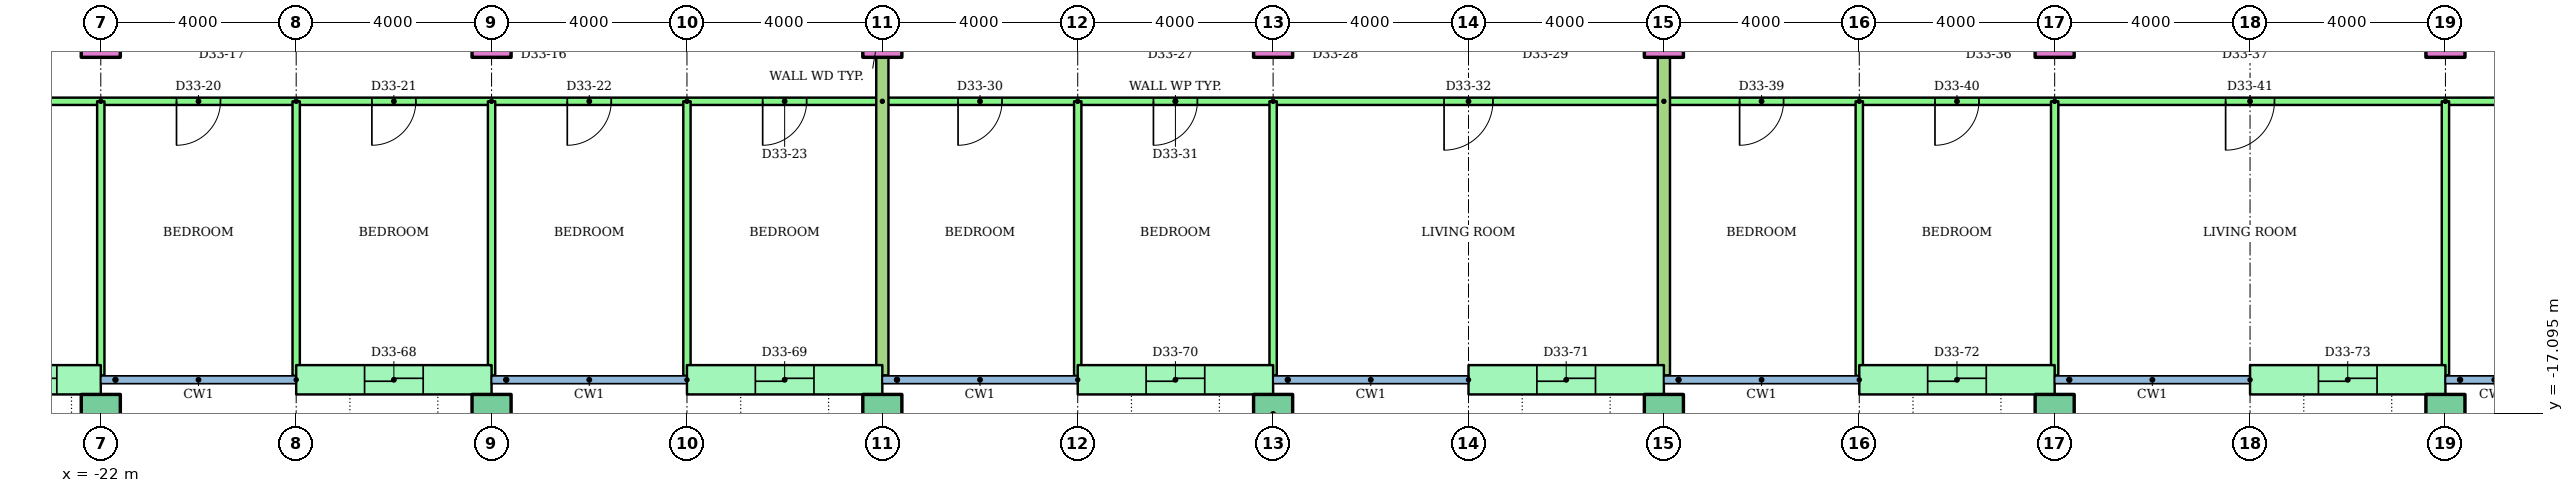
"""IFC4 building model, lengths in metres.
Left out: names, types, materials, properties, quantities, classifications, styles, units other than length and angle.
Written with IfcOpenShell. Run it as: python <this file> out.ifc"""

import sys

from ifc_helpers import new_model, si_unit, direction, frame, frame_2d, origin, origin_2d, place, context, subcontext, project, spatial, rectangle, hollow_rectangle, extrude, element, fill, save


model = new_model("IFC4")
c1 = context("Model", 3, precision=1e-05, world=origin(), true_north=direction((0.0, 1.0)))
c2 = subcontext(c1, "Body", "Model", "MODEL_VIEW")
j1 = project(units=[si_unit("LENGTHUNIT", "METRE"), si_unit("PLANEANGLEUNIT", "RADIAN")], contexts=[c1])
p1 = place(None, origin())
s1 = spatial("IfcSite", under=j1, at=p1, CompositionType="ELEMENT")
p2 = place(p1, origin())
s2 = spatial("IfcBuilding", under=s1, at=p2, CompositionType="ELEMENT")
p3 = place(p2, frame((0.0, 0.0, 129.4)))
s3 = spatial("IfcBuildingStorey", under=s2, at=p3, CompositionType="ELEMENT", Elevation=129.4)
for number, where in (
    (1, (-22.0, -17.1, 0.0)),
    (2, (-14.0, -17.1, 0.0)),
    (3, (-6.0, -17.1, 0.0)),
    (4, (2.0, -17.1, 0.0)),
    (5, (10.0, -17.1, 0.0)),
    (6, (18.0, -17.1, 0.0)),
    (7, (26.0, -17.1, 0.0)),
):
    element("IfcColumn", number, at=place(p3, frame(where)), inside=s3, PredefinedType="COLUMN", context=c2, shape_type="SweptSolid", body=[
        extrude(hollow_rectangle(XDim=0.8, YDim=0.8, WallThickness=0.04, at=origin_2d()), origin(), (0.0, 0.0, 1.0), 3.2),
    ])
for number, where in (
    (8, (-22.0, -9.4, 0.0)),
    (9, (-14.0, -9.4, 0.0)),
    (10, (-6.0, -9.4, 0.0)),
    (11, (2.0, -9.4, 0.0)),
    (12, (10.0, -9.4, 0.0)),
    (13, (18.0, -9.4, 0.0)),
    (14, (26.0, -9.4, 0.0)),
):
    element("IfcColumn", number, at=place(p3, frame(where)), inside=s3, PredefinedType="COLUMN", context=c2, shape_type="SweptSolid", body=[
        extrude(rectangle(XDim=0.8, YDim=0.8, at=origin_2d()), origin(), (0.0, 0.0, 1.0), 3.2),
    ])
p4 = place(p3, frame((-25.0, -16.4, 0.0)))
e15 = element("IfcWall", 15, at=p4, inside=s3, PredefinedType="STANDARD", context=c2, shape_type="SweptSolid", body=[
    extrude(rectangle(XDim=3.0, YDim=0.6, at=frame_2d((1.5, 0.0))), origin(), (0.0, 0.0, 1.0), 2.92),
])
p5 = place(p4, frame((0.9, 0.0, 0.0)))
e16 = element("IfcOpeningElement", 16, at=p5, cuts=e15, PredefinedType="OPENING", context=c2, shape_type="SweptSolid", body=[
    extrude(rectangle(XDim=1.2, YDim=2.1, at=frame_2d((0.6, 1.05))), frame((0.0, 0.31, 0.0), z_axis=(0.0, -1.0, 0.0), x_axis=(1.0, 0.0, 0.0)), (0.0, 0.0, 1.0), 0.62),
])
p6 = place(p3, frame((-18.0, -16.4, 0.0)))
e17 = element("IfcWall", 17, at=p6, inside=s3, PredefinedType="STANDARD", context=c2, shape_type="SweptSolid", body=[
    extrude(rectangle(XDim=4.0, YDim=0.6, at=frame_2d((2.0, 0.0))), origin(), (0.0, 0.0, 1.0), 2.92),
])
p7 = place(p6, frame((1.4, 0.0, 0.0)))
e18 = element("IfcOpeningElement", 18, at=p7, cuts=e17, PredefinedType="OPENING", context=c2, shape_type="SweptSolid", body=[
    extrude(rectangle(XDim=1.2, YDim=2.1, at=frame_2d((0.6, 1.05))), frame((0.0, 0.31, 0.0), z_axis=(0.0, -1.0, 0.0), x_axis=(1.0, 0.0, 0.0)), (0.0, 0.0, 1.0), 0.62),
])
p8 = place(p3, frame((-10.0, -16.4, 0.0)))
e19 = element("IfcWall", 19, at=p8, inside=s3, PredefinedType="STANDARD", context=c2, shape_type="SweptSolid", body=[
    extrude(rectangle(XDim=4.0, YDim=0.6, at=frame_2d((2.0, 0.0))), origin(), (0.0, 0.0, 1.0), 2.92),
])
p9 = place(p8, frame((1.4, 0.0, 0.0)))
e20 = element("IfcOpeningElement", 20, at=p9, cuts=e19, PredefinedType="OPENING", context=c2, shape_type="SweptSolid", body=[
    extrude(rectangle(XDim=1.2, YDim=2.1, at=frame_2d((0.6, 1.05))), frame((0.0, 0.31, 0.0), z_axis=(0.0, -1.0, 0.0), x_axis=(1.0, 0.0, 0.0)), (0.0, 0.0, 1.0), 0.62),
])
p10 = place(p3, frame((-2.0, -16.4, 0.0)))
e21 = element("IfcWall", 21, at=p10, inside=s3, PredefinedType="STANDARD", context=c2, shape_type="SweptSolid", body=[
    extrude(rectangle(XDim=4.0, YDim=0.6, at=frame_2d((2.0, 0.0))), origin(), (0.0, 0.0, 1.0), 2.92),
])
p11 = place(p10, frame((1.4, 0.0, 0.0)))
e22 = element("IfcOpeningElement", 22, at=p11, cuts=e21, PredefinedType="OPENING", context=c2, shape_type="SweptSolid", body=[
    extrude(rectangle(XDim=1.2, YDim=2.1, at=frame_2d((0.6, 1.05))), frame((0.0, 0.31, 0.0), z_axis=(0.0, -1.0, 0.0), x_axis=(1.0, 0.0, 0.0)), (0.0, 0.0, 1.0), 0.62),
])
p12 = place(p3, frame((6.0, -16.4, 0.0)))
e23 = element("IfcWall", 23, at=p12, inside=s3, PredefinedType="STANDARD", context=c2, shape_type="SweptSolid", body=[
    extrude(rectangle(XDim=4.0, YDim=0.6, at=frame_2d((2.0, 0.0))), origin(), (0.0, 0.0, 1.0), 2.92),
])
p13 = place(p12, frame((1.4, 0.0, 0.0)))
e24 = element("IfcOpeningElement", 24, at=p13, cuts=e23, PredefinedType="OPENING", context=c2, shape_type="SweptSolid", body=[
    extrude(rectangle(XDim=1.2, YDim=2.1, at=frame_2d((0.6, 1.05))), frame((0.0, 0.31, 0.0), z_axis=(0.0, -1.0, 0.0), x_axis=(1.0, 0.0, 0.0)), (0.0, 0.0, 1.0), 0.62),
])
p14 = place(p3, frame((14.0, -16.4, 0.0)))
e25 = element("IfcWall", 25, at=p14, inside=s3, PredefinedType="STANDARD", context=c2, shape_type="SweptSolid", body=[
    extrude(rectangle(XDim=4.0, YDim=0.6, at=frame_2d((2.0, 0.0))), origin(), (0.0, 0.0, 1.0), 2.92),
])
p15 = place(p14, frame((1.4, 0.0, 0.0)))
e26 = element("IfcOpeningElement", 26, at=p15, cuts=e25, PredefinedType="OPENING", context=c2, shape_type="SweptSolid", body=[
    extrude(rectangle(XDim=1.2, YDim=2.1, at=frame_2d((0.6, 1.05))), frame((0.0, 0.31, 0.0), z_axis=(0.0, -1.0, 0.0), x_axis=(1.0, 0.0, 0.0)), (0.0, 0.0, 1.0), 0.62),
])
p16 = place(p3, frame((22.0, -16.4, 0.0)))
e27 = element("IfcWall", 27, at=p16, inside=s3, PredefinedType="STANDARD", context=c2, shape_type="SweptSolid", body=[
    extrude(rectangle(XDim=4.0, YDim=0.6, at=frame_2d((2.0, 0.0))), origin(), (0.0, 0.0, 1.0), 2.92),
])
p17 = place(p16, frame((1.4, 0.0, 0.0)))
e28 = element("IfcOpeningElement", 28, at=p17, cuts=e27, PredefinedType="OPENING", context=c2, shape_type="SweptSolid", body=[
    extrude(rectangle(XDim=1.2, YDim=2.1, at=frame_2d((0.6, 1.05))), frame((0.0, 0.31, 0.0), z_axis=(0.0, -1.0, 0.0), x_axis=(1.0, 0.0, 0.0)), (0.0, 0.0, 1.0), 0.62),
])
p18 = place(p3, frame((-6.0, -10.7, 0.0), z_axis=(0.0, 0.0, 1.0), x_axis=(-1.0, 0.0, 0.0)))
e29 = element("IfcWall", 29, at=p18, inside=s3, PredefinedType="PARTITIONING", context=c2, shape_type="SweptSolid", body=[
    extrude(rectangle(XDim=26.72, YDim=0.15, at=frame_2d((13.36, 0.0))), origin(), (0.0, 0.0, 1.0), 2.4),
])
p19 = place(p18, frame((20.75, 0.0, 0.0)))
e30 = element("IfcOpeningElement", 30, at=p19, cuts=e29, PredefinedType="OPENING", context=c2, shape_type="SweptSolid", body=[
    extrude(rectangle(XDim=1.0, YDim=2.1, at=frame_2d((0.5, 1.05))), frame((0.0, 0.085, 0.0), z_axis=(0.0, -1.0, 0.0), x_axis=(1.0, 0.0, 0.0)), (0.0, 0.0, 1.0), 0.17),
])
p20 = place(p18, frame((13.55, 0.0, 0.0)))
e31 = element("IfcOpeningElement", 31, at=p20, cuts=e29, PredefinedType="OPENING", context=c2, shape_type="SweptSolid", body=[
    extrude(rectangle(XDim=0.9, YDim=2.1, at=frame_2d((0.45, 1.05))), frame((0.0, 0.085, 0.0), z_axis=(0.0, -1.0, 0.0), x_axis=(1.0, 0.0, 0.0)), (0.0, 0.0, 1.0), 0.17),
])
p21 = place(p18, frame((9.55, 0.0, 0.0)))
e32 = element("IfcOpeningElement", 32, at=p21, cuts=e29, PredefinedType="OPENING", context=c2, shape_type="SweptSolid", body=[
    extrude(rectangle(XDim=0.9, YDim=2.1, at=frame_2d((0.45, 1.05))), frame((0.0, 0.085, 0.0), z_axis=(0.0, -1.0, 0.0), x_axis=(1.0, 0.0, 0.0)), (0.0, 0.0, 1.0), 0.17),
])
p22 = place(p18, frame((5.55, 0.0, 0.0)))
e33 = element("IfcOpeningElement", 33, at=p22, cuts=e29, PredefinedType="OPENING", context=c2, shape_type="SweptSolid", body=[
    extrude(rectangle(XDim=0.9, YDim=2.1, at=frame_2d((0.45, 1.05))), frame((0.0, 0.085, 0.0), z_axis=(0.0, -1.0, 0.0), x_axis=(1.0, 0.0, 0.0)), (0.0, 0.0, 1.0), 0.17),
])
p23 = place(p18, frame((1.55, 0.0, 0.0)))
e34 = element("IfcOpeningElement", 34, at=p23, cuts=e29, PredefinedType="OPENING", context=c2, shape_type="SweptSolid", body=[
    extrude(rectangle(XDim=0.9, YDim=2.1, at=frame_2d((0.45, 1.05))), frame((0.0, 0.085, 0.0), z_axis=(0.0, -1.0, 0.0), x_axis=(1.0, 0.0, 0.0)), (0.0, 0.0, 1.0), 0.17),
])
p24 = place(p3, frame((-22.0, -10.7, 0.0), z_axis=(0.0, 0.0, 1.0), x_axis=(0.0, -1.0, 0.0)))
e35 = element("IfcWall", 35, at=p24, inside=s3, PredefinedType="PARTITIONING", context=c2, shape_type="SweptSolid", body=[
    extrude(rectangle(XDim=5.61, YDim=0.15, at=frame_2d((2.805, 0.0))), origin(), (0.0, 0.0, 1.0), 2.4),
])
p25 = place(p3, frame((-18.0, -10.7, 0.0), z_axis=(0.0, 0.0, 1.0), x_axis=(0.0, -1.0, 0.0)))
e36 = element("IfcWall", 36, at=p25, inside=s3, PredefinedType="PARTITIONING", context=c2, shape_type="SweptSolid", body=[
    extrude(rectangle(XDim=5.621, YDim=0.15, at=frame_2d((2.811, 0.0))), origin(), (0.0, 0.0, 1.0), 2.4),
])
p26 = place(p3, frame((-14.0, -10.7, 0.0), z_axis=(0.0, 0.0, 1.0), x_axis=(0.0, -1.0, 0.0)))
e37 = element("IfcWall", 37, at=p26, inside=s3, PredefinedType="PARTITIONING", context=c2, shape_type="SweptSolid", body=[
    extrude(rectangle(XDim=5.61, YDim=0.15, at=frame_2d((2.805, 0.0))), origin(), (0.0, 0.0, 1.0), 2.4),
])
p27 = place(p3, frame((-10.0, -10.7, 0.0), z_axis=(0.0, 0.0, 1.0), x_axis=(0.0, -1.0, 0.0)))
e38 = element("IfcWall", 38, at=p27, inside=s3, PredefinedType="PARTITIONING", context=c2, shape_type="SweptSolid", body=[
    extrude(rectangle(XDim=5.621, YDim=0.15, at=frame_2d((2.811, 0.0))), origin(), (0.0, 0.0, 1.0), 2.4),
])
p28 = place(p3, frame((10.0, -10.7, 0.0), z_axis=(0.0, 0.0, 1.0), x_axis=(-1.0, 0.0, 0.0)))
e39 = element("IfcWall", 39, at=p28, inside=s3, PredefinedType="PARTITIONING", context=c2, shape_type="SweptSolid", body=[
    extrude(rectangle(XDim=16.0, YDim=0.15, at=frame_2d((8.0, 0.0))), origin(), (0.0, 0.0, 1.0), 2.4),
])
p29 = place(p28, frame((13.55, 0.0, 0.0)))
e40 = element("IfcOpeningElement", 40, at=p29, cuts=e39, PredefinedType="OPENING", context=c2, shape_type="SweptSolid", body=[
    extrude(rectangle(XDim=0.9, YDim=2.1, at=frame_2d((0.45, 1.05))), frame((0.0, 0.085, 0.0), z_axis=(0.0, -1.0, 0.0), x_axis=(1.0, 0.0, 0.0)), (0.0, 0.0, 1.0), 0.17),
])
p30 = place(p28, frame((9.55, 0.0, 0.0)))
e41 = element("IfcOpeningElement", 41, at=p30, cuts=e39, PredefinedType="OPENING", context=c2, shape_type="SweptSolid", body=[
    extrude(rectangle(XDim=0.9, YDim=2.1, at=frame_2d((0.45, 1.05))), frame((0.0, 0.085, 0.0), z_axis=(0.0, -1.0, 0.0), x_axis=(1.0, 0.0, 0.0)), (0.0, 0.0, 1.0), 0.17),
])
p31 = place(p28, frame((3.5, 0.0, 0.0)))
e42 = element("IfcOpeningElement", 42, at=p31, cuts=e39, PredefinedType="OPENING", context=c2, shape_type="SweptSolid", body=[
    extrude(rectangle(XDim=1.0, YDim=2.1, at=frame_2d((0.5, 1.05))), frame((0.0, 0.085, 0.0), z_axis=(0.0, -1.0, 0.0), x_axis=(1.0, 0.0, 0.0)), (0.0, 0.0, 1.0), 0.17),
])
p32 = place(p3, frame((-2.0, -10.7, 0.0), z_axis=(0.0, 0.0, 1.0), x_axis=(0.0, -1.0, 0.0)))
e43 = element("IfcWall", 43, at=p32, inside=s3, PredefinedType="PARTITIONING", context=c2, shape_type="SweptSolid", body=[
    extrude(rectangle(XDim=5.621, YDim=0.15, at=frame_2d((2.811, 0.0))), origin(), (0.0, 0.0, 1.0), 2.4),
])
p33 = place(p3, frame((2.0, -10.7, 0.0), z_axis=(0.0, 0.0, 1.0), x_axis=(0.0, -1.0, 0.0)))
e44 = element("IfcWall", 44, at=p33, inside=s3, PredefinedType="PARTITIONING", context=c2, shape_type="SweptSolid", body=[
    extrude(rectangle(XDim=5.61, YDim=0.15, at=frame_2d((2.805, 0.0))), origin(), (0.0, 0.0, 1.0), 2.4),
])
p34 = place(p3, frame((-6.0, -1.4, 0.0), z_axis=(0.0, 0.0, 1.0), x_axis=(0.0, -1.0, 0.0)))
e45 = element("IfcWall", 45, at=p34, inside=s3, PredefinedType="PARTITIONING", context=c2, shape_type="SweptSolid", body=[
    extrude(rectangle(XDim=14.91, YDim=0.25, at=frame_2d((7.455, 0.0))), origin(), (0.0, 0.0, 1.0), 2.4),
])
p35 = place(p3, frame((32.72, -10.7, 0.0), z_axis=(0.0, 0.0, 1.0), x_axis=(-1.0, 0.0, 0.0)))
e46 = element("IfcWall", 46, at=p35, inside=s3, PredefinedType="PARTITIONING", context=c2, shape_type="SweptSolid", body=[
    extrude(rectangle(XDim=22.72, YDim=0.15, at=frame_2d((11.36, 0.0))), origin(), (0.0, 0.0, 1.0), 2.4),
])
p36 = place(p35, frame((20.27, 0.0, 0.0)))
e47 = element("IfcOpeningElement", 47, at=p36, cuts=e46, PredefinedType="OPENING", context=c2, shape_type="SweptSolid", body=[
    extrude(rectangle(XDim=0.9, YDim=2.1, at=frame_2d((0.45, 1.05))), frame((0.0, 0.085, 0.0), z_axis=(0.0, -1.0, 0.0), x_axis=(1.0, 0.0, 0.0)), (0.0, 0.0, 1.0), 0.17),
])
p37 = place(p35, frame((16.27, 0.0, 0.0)))
e48 = element("IfcOpeningElement", 48, at=p37, cuts=e46, PredefinedType="OPENING", context=c2, shape_type="SweptSolid", body=[
    extrude(rectangle(XDim=0.9, YDim=2.1, at=frame_2d((0.45, 1.05))), frame((0.0, 0.085, 0.0), z_axis=(0.0, -1.0, 0.0), x_axis=(1.0, 0.0, 0.0)), (0.0, 0.0, 1.0), 0.17),
])
p38 = place(p35, frame((10.22, 0.0, 0.0)))
e49 = element("IfcOpeningElement", 49, at=p38, cuts=e46, PredefinedType="OPENING", context=c2, shape_type="SweptSolid", body=[
    extrude(rectangle(XDim=1.0, YDim=2.1, at=frame_2d((0.5, 1.05))), frame((0.0, 0.085, 0.0), z_axis=(0.0, -1.0, 0.0), x_axis=(1.0, 0.0, 0.0)), (0.0, 0.0, 1.0), 0.17),
])
p39 = place(p35, frame((3.02, 0.0, 0.0)))
e50 = element("IfcOpeningElement", 50, at=p39, cuts=e46, PredefinedType="OPENING", context=c2, shape_type="SweptSolid", body=[
    extrude(rectangle(XDim=0.9, YDim=2.1, at=frame_2d((0.45, 1.05))), frame((0.0, 0.085, 0.0), z_axis=(0.0, -1.0, 0.0), x_axis=(1.0, 0.0, 0.0)), (0.0, 0.0, 1.0), 0.17),
])
p40 = place(p3, frame((14.0, -10.7, 0.0), z_axis=(0.0, 0.0, 1.0), x_axis=(0.0, -1.0, 0.0)))
e51 = element("IfcWall", 51, at=p40, inside=s3, PredefinedType="PARTITIONING", context=c2, shape_type="SweptSolid", body=[
    extrude(rectangle(XDim=5.621, YDim=0.15, at=frame_2d((2.811, 0.0))), origin(), (0.0, 0.0, 1.0), 2.4),
])
for number, where, z_axis, x_axis in (
    (52, (18.0, -10.7, 0.0), (0.0, 0.0, 1.0), (0.0, -1.0, 0.0)),
    (53, (26.0, -10.7, 0.0), (0.0, 0.0, 1.0), (0.0, -1.0, 0.0)),
):
    element("IfcWall", number, at=place(p3, frame(where, z_axis=z_axis, x_axis=x_axis)), inside=s3, PredefinedType="PARTITIONING", context=c2, shape_type="SweptSolid", body=[
        extrude(rectangle(XDim=5.61, YDim=0.15, at=frame_2d((2.805, 0.0))), origin(), (0.0, 0.0, 1.0), 2.4),
    ])
p41 = place(p3, frame((10.0, -1.4, 0.0), z_axis=(0.0, 0.0, 1.0), x_axis=(0.0, -1.0, 0.0)))
e54 = element("IfcWall", 54, at=p41, inside=s3, PredefinedType="PARTITIONING", context=c2, shape_type="SweptSolid", body=[
    extrude(rectangle(XDim=14.91, YDim=0.25, at=frame_2d((7.455, 0.0))), origin(), (0.0, 0.0, 1.0), 2.4),
])
p42 = place(p20, origin())
e55 = element("IfcDoor", 55, at=p42, inside=s3, OperationType="SINGLE_SWING_RIGHT", PredefinedType="DOOR", context=c2, shape_type="SweptSolid", body=[
    extrude(rectangle(XDim=0.9, YDim=2.1, at=frame_2d((0.45, 1.05))), frame((0.0, 0.025, 0.0), z_axis=(0.0, -1.0, 0.0), x_axis=(1.0, 0.0, 0.0)), (0.0, 0.0, 1.0), 0.05),
])
fill(e31, e55)
p43 = place(p21, origin())
e56 = element("IfcDoor", 56, at=p43, inside=s3, OperationType="SINGLE_SWING_RIGHT", PredefinedType="DOOR", context=c2, shape_type="SweptSolid", body=[
    extrude(rectangle(XDim=0.9, YDim=2.1, at=frame_2d((0.45, 1.05))), frame((0.0, 0.025, 0.0), z_axis=(0.0, -1.0, 0.0), x_axis=(1.0, 0.0, 0.0)), (0.0, 0.0, 1.0), 0.05),
])
fill(e32, e56)
p44 = place(p22, origin())
e57 = element("IfcDoor", 57, at=p44, inside=s3, OperationType="SINGLE_SWING_RIGHT", PredefinedType="DOOR", context=c2, shape_type="SweptSolid", body=[
    extrude(rectangle(XDim=0.9, YDim=2.1, at=frame_2d((0.45, 1.05))), frame((0.0, 0.025, 0.0), z_axis=(0.0, -1.0, 0.0), x_axis=(1.0, 0.0, 0.0)), (0.0, 0.0, 1.0), 0.05),
])
fill(e33, e57)
p45 = place(p23, origin())
e58 = element("IfcDoor", 58, at=p45, inside=s3, OperationType="SINGLE_SWING_RIGHT", PredefinedType="DOOR", context=c2, shape_type="SweptSolid", body=[
    extrude(rectangle(XDim=0.9, YDim=2.1, at=frame_2d((0.45, 1.05))), frame((0.0, 0.025, 0.0), z_axis=(0.0, -1.0, 0.0), x_axis=(1.0, 0.0, 0.0)), (0.0, 0.0, 1.0), 0.05),
])
fill(e34, e58)
p46 = place(p29, origin())
e59 = element("IfcDoor", 59, at=p46, inside=s3, OperationType="SINGLE_SWING_RIGHT", PredefinedType="DOOR", context=c2, shape_type="SweptSolid", body=[
    extrude(rectangle(XDim=0.9, YDim=2.1, at=frame_2d((0.45, 1.05))), frame((0.0, 0.025, 0.0), z_axis=(0.0, -1.0, 0.0), x_axis=(1.0, 0.0, 0.0)), (0.0, 0.0, 1.0), 0.05),
])
fill(e40, e59)
p47 = place(p30, origin())
e60 = element("IfcDoor", 60, at=p47, inside=s3, OperationType="SINGLE_SWING_RIGHT", PredefinedType="DOOR", context=c2, shape_type="SweptSolid", body=[
    extrude(rectangle(XDim=0.9, YDim=2.1, at=frame_2d((0.45, 1.05))), frame((0.0, 0.025, 0.0), z_axis=(0.0, -1.0, 0.0), x_axis=(1.0, 0.0, 0.0)), (0.0, 0.0, 1.0), 0.05),
])
fill(e41, e60)
p48 = place(p31, origin())
e61 = element("IfcDoor", 61, at=p48, inside=s3, OperationType="SINGLE_SWING_RIGHT", PredefinedType="DOOR", context=c2, shape_type="SweptSolid", body=[
    extrude(rectangle(XDim=1.0, YDim=2.1, at=frame_2d((0.5, 1.05))), frame((0.0, 0.025, 0.0), z_axis=(0.0, -1.0, 0.0), x_axis=(1.0, 0.0, 0.0)), (0.0, 0.0, 1.0), 0.05),
])
fill(e42, e61)
p49 = place(p36, origin())
e62 = element("IfcDoor", 62, at=p49, inside=s3, OperationType="SINGLE_SWING_RIGHT", PredefinedType="DOOR", context=c2, shape_type="SweptSolid", body=[
    extrude(rectangle(XDim=0.9, YDim=2.1, at=frame_2d((0.45, 1.05))), frame((0.0, 0.025, 0.0), z_axis=(0.0, -1.0, 0.0), x_axis=(1.0, 0.0, 0.0)), (0.0, 0.0, 1.0), 0.05),
])
fill(e47, e62)
p50 = place(p37, origin())
e63 = element("IfcDoor", 63, at=p50, inside=s3, OperationType="SINGLE_SWING_RIGHT", PredefinedType="DOOR", context=c2, shape_type="SweptSolid", body=[
    extrude(rectangle(XDim=0.9, YDim=2.1, at=frame_2d((0.45, 1.05))), frame((0.0, 0.025, 0.0), z_axis=(0.0, -1.0, 0.0), x_axis=(1.0, 0.0, 0.0)), (0.0, 0.0, 1.0), 0.05),
])
fill(e48, e63)
p51 = place(p38, origin())
e64 = element("IfcDoor", 64, at=p51, inside=s3, OperationType="SINGLE_SWING_RIGHT", PredefinedType="DOOR", context=c2, shape_type="SweptSolid", body=[
    extrude(rectangle(XDim=1.0, YDim=2.1, at=frame_2d((0.5, 1.05))), frame((0.0, 0.025, 0.0), z_axis=(0.0, -1.0, 0.0), x_axis=(1.0, 0.0, 0.0)), (0.0, 0.0, 1.0), 0.05),
])
fill(e49, e64)
p52 = place(p5, origin())
e65 = element("IfcDoor", 65, at=p52, inside=s3, OperationType="SLIDING_TO_LEFT", PredefinedType="DOOR", context=c2, shape_type="SweptSolid", body=[
    extrude(rectangle(XDim=1.2, YDim=2.1, at=frame_2d((0.6, 1.05))), frame((0.0, 0.025, 0.0), z_axis=(0.0, -1.0, 0.0), x_axis=(1.0, 0.0, 0.0)), (0.0, 0.0, 1.0), 0.05),
])
fill(e16, e65)
p53 = place(p7, origin())
e66 = element("IfcDoor", 66, at=p53, inside=s3, OperationType="SLIDING_TO_LEFT", PredefinedType="DOOR", context=c2, shape_type="SweptSolid", body=[
    extrude(rectangle(XDim=1.2, YDim=2.1, at=frame_2d((0.6, 1.05))), frame((0.0, 0.025, 0.0), z_axis=(0.0, -1.0, 0.0), x_axis=(1.0, 0.0, 0.0)), (0.0, 0.0, 1.0), 0.05),
])
fill(e18, e66)
p54 = place(p9, origin())
e67 = element("IfcDoor", 67, at=p54, inside=s3, OperationType="SLIDING_TO_LEFT", PredefinedType="DOOR", context=c2, shape_type="SweptSolid", body=[
    extrude(rectangle(XDim=1.2, YDim=2.1, at=frame_2d((0.6, 1.05))), frame((0.0, 0.025, 0.0), z_axis=(0.0, -1.0, 0.0), x_axis=(1.0, 0.0, 0.0)), (0.0, 0.0, 1.0), 0.05),
])
fill(e20, e67)
p55 = place(p11, origin())
e68 = element("IfcDoor", 68, at=p55, inside=s3, OperationType="SLIDING_TO_LEFT", PredefinedType="DOOR", context=c2, shape_type="SweptSolid", body=[
    extrude(rectangle(XDim=1.2, YDim=2.1, at=frame_2d((0.6, 1.05))), frame((0.0, 0.025, 0.0), z_axis=(0.0, -1.0, 0.0), x_axis=(1.0, 0.0, 0.0)), (0.0, 0.0, 1.0), 0.05),
])
fill(e22, e68)
p56 = place(p13, origin())
e69 = element("IfcDoor", 69, at=p56, inside=s3, OperationType="SLIDING_TO_LEFT", PredefinedType="DOOR", context=c2, shape_type="SweptSolid", body=[
    extrude(rectangle(XDim=1.2, YDim=2.1, at=frame_2d((0.6, 1.05))), frame((0.0, 0.025, 0.0), z_axis=(0.0, -1.0, 0.0), x_axis=(1.0, 0.0, 0.0)), (0.0, 0.0, 1.0), 0.05),
])
fill(e24, e69)
p57 = place(p15, origin())
e70 = element("IfcDoor", 70, at=p57, inside=s3, OperationType="SLIDING_TO_LEFT", PredefinedType="DOOR", context=c2, shape_type="SweptSolid", body=[
    extrude(rectangle(XDim=1.2, YDim=2.1, at=frame_2d((0.6, 1.05))), frame((0.0, 0.025, 0.0), z_axis=(0.0, -1.0, 0.0), x_axis=(1.0, 0.0, 0.0)), (0.0, 0.0, 1.0), 0.05),
])
fill(e26, e70)
p58 = place(p17, origin())
e71 = element("IfcDoor", 71, at=p58, inside=s3, OperationType="SLIDING_TO_LEFT", PredefinedType="DOOR", context=c2, shape_type="SweptSolid", body=[
    extrude(rectangle(XDim=1.2, YDim=2.1, at=frame_2d((0.6, 1.05))), frame((0.0, 0.025, 0.0), z_axis=(0.0, -1.0, 0.0), x_axis=(1.0, 0.0, 0.0)), (0.0, 0.0, 1.0), 0.05),
])
fill(e28, e71)
save(model, sys.argv[1])
